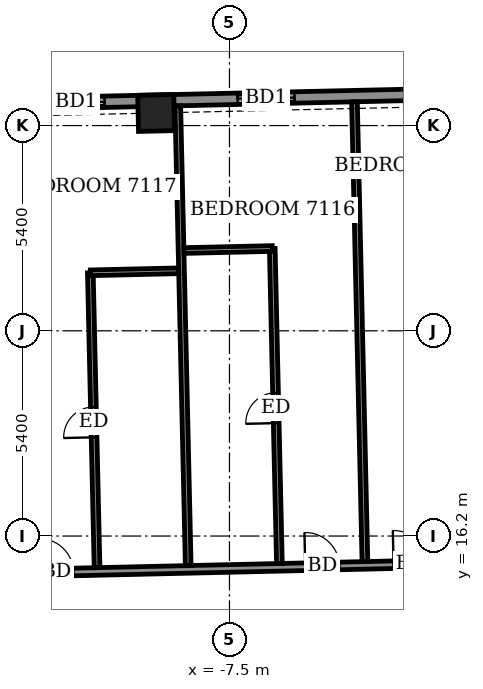
"""IFC4 building model, lengths in metres.
Left out: names, types, materials, properties, quantities, classifications, styles, units other than length and angle.
Written with IfcOpenShell. Run it as: python <this file> out.ifc"""

import sys

from ifc_helpers import new_model, si_unit, direction, frame, frame_2d, origin, origin_2d, place, context, subcontext, project, spatial, rectangle, extrude, element, fill, save


model = new_model("IFC4")
c1 = context("Model", 3, precision=1e-05, world=origin(), true_north=direction((0.0, 1.0)))
c2 = subcontext(c1, "Body", "Model", "MODEL_VIEW")
j1 = project(units=[si_unit("LENGTHUNIT", "METRE"), si_unit("PLANEANGLEUNIT", "RADIAN")], contexts=[c1])
p1 = place(None, origin())
s1 = spatial("IfcSite", under=j1, at=p1, CompositionType="ELEMENT")
p2 = place(p1, origin())
s2 = spatial("IfcBuilding", under=s1, at=p2, CompositionType="ELEMENT")
p3 = place(p2, frame((0.0, 0.0, 279.9)))
s3 = spatial("IfcBuildingStorey", under=s2, at=p3, CompositionType="ELEMENT", Elevation=279.9)
p4 = place(p3, frame((-9.429, 27.331, -0.55), z_axis=(0.0, 0.0, 1.0), x_axis=(-0.9997425919, -0.02268810132, 0.0)))
e1 = element("IfcColumn", 1, at=p4, inside=s3, PredefinedType="COLUMN", context=c2, shape_type="SweptSolid", body=[
    extrude(rectangle(XDim=0.95, YDim=0.95, at=origin_2d()), origin(), (0.0, 0.0, 1.0), 3.6),
])
p5 = place(p3, frame((26.216, 28.465, 0.0), z_axis=(0.0, 0.0, 1.0), x_axis=(-0.999742843677, -0.022677004157, 0.0)))
e2 = element("IfcWall", 2, at=p5, inside=s3, PredefinedType="SOLIDWALL", context=c2, shape_type="SweptSolid", body=[
    extrude(rectangle(XDim=49.836, YDim=0.3, at=frame_2d((24.918, 0.0))), origin(), (0.0, 0.0, 1.0), 2.5),
])
p6 = place(p5, frame((0.938, 0.0, 0.0)))
e3 = element("IfcOpeningElement", 3, at=p6, cuts=e2, PredefinedType="OPENING", context=c2, shape_type="SweptSolid", body=[
    extrude(rectangle(XDim=1.5, YDim=2.4, at=frame_2d((0.75, 1.2))), frame((0.0, 0.16, 0.0), z_axis=(0.0, -1.0, 0.0), x_axis=(1.0, 0.0, 0.0)), (0.0, 0.0, 1.0), 0.32),
])
p7 = place(p5, frame((4.087, 0.0, 0.0)))
e4 = element("IfcOpeningElement", 4, at=p7, cuts=e2, PredefinedType="OPENING", context=c2, shape_type="SweptSolid", body=[
    extrude(rectangle(XDim=1.5, YDim=2.4, at=frame_2d((0.75, 1.2))), frame((0.0, 0.16, 0.0), z_axis=(0.0, -1.0, 0.0), x_axis=(1.0, 0.0, 0.0)), (0.0, 0.0, 1.0), 0.32),
])
p8 = place(p5, frame((8.711, 0.0, 0.0)))
e5 = element("IfcOpeningElement", 5, at=p8, cuts=e2, PredefinedType="OPENING", context=c2, shape_type="SweptSolid", body=[
    extrude(rectangle(XDim=1.5, YDim=2.4, at=frame_2d((0.75, 1.2))), frame((0.0, 0.16, 0.0), z_axis=(0.0, -1.0, 0.0), x_axis=(1.0, 0.0, 0.0)), (0.0, 0.0, 1.0), 0.32),
])
p9 = place(p5, frame((12.067, 0.0, 0.0)))
e6 = element("IfcOpeningElement", 6, at=p9, cuts=e2, PredefinedType="OPENING", context=c2, shape_type="SweptSolid", body=[
    extrude(rectangle(XDim=1.5, YDim=2.4, at=frame_2d((0.75, 1.2))), frame((0.0, 0.16, 0.0), z_axis=(0.0, -1.0, 0.0), x_axis=(1.0, 0.0, 0.0)), (0.0, 0.0, 1.0), 0.32),
])
p10 = place(p5, frame((17.836, 0.0, 0.0)))
e7 = element("IfcOpeningElement", 7, at=p10, cuts=e2, PredefinedType="OPENING", context=c2, shape_type="SweptSolid", body=[
    extrude(rectangle(XDim=1.5, YDim=2.4, at=frame_2d((0.75, 1.2))), frame((0.0, 0.16, 0.0), z_axis=(0.0, -1.0, 0.0), x_axis=(1.0, 0.0, 0.0)), (0.0, 0.0, 1.0), 0.32),
])
p11 = place(p5, frame((22.849, 0.0, 0.0)))
e8 = element("IfcOpeningElement", 8, at=p11, cuts=e2, PredefinedType="OPENING", context=c2, shape_type="SweptSolid", body=[
    extrude(rectangle(XDim=1.5, YDim=2.4, at=frame_2d((0.75, 1.2))), frame((0.0, 0.16, 0.0), z_axis=(0.0, -1.0, 0.0), x_axis=(1.0, 0.0, 0.0)), (0.0, 0.0, 1.0), 0.32),
])
p12 = place(p5, frame((26.205, 0.0, 0.0)))
e9 = element("IfcOpeningElement", 9, at=p12, cuts=e2, PredefinedType="OPENING", context=c2, shape_type="SweptSolid", body=[
    extrude(rectangle(XDim=1.5, YDim=2.4, at=frame_2d((0.75, 1.2))), frame((0.0, 0.16, 0.0), z_axis=(0.0, -1.0, 0.0), x_axis=(1.0, 0.0, 0.0)), (0.0, 0.0, 1.0), 0.32),
])
p13 = place(p5, frame((32.011, 0.0, 0.0)))
e10 = element("IfcOpeningElement", 10, at=p13, cuts=e2, PredefinedType="OPENING", context=c2, shape_type="SweptSolid", body=[
    extrude(rectangle(XDim=1.5, YDim=2.4, at=frame_2d((0.75, 1.2))), frame((0.0, 0.16, 0.0), z_axis=(0.0, -1.0, 0.0), x_axis=(1.0, 0.0, 0.0)), (0.0, 0.0, 1.0), 0.32),
])
p14 = place(p5, frame((37.011, 0.0, 0.0)))
e11 = element("IfcOpeningElement", 11, at=p14, cuts=e2, PredefinedType="OPENING", context=c2, shape_type="SweptSolid", body=[
    extrude(rectangle(XDim=1.5, YDim=2.4, at=frame_2d((0.75, 1.2))), frame((0.0, 0.16, 0.0), z_axis=(0.0, -1.0, 0.0), x_axis=(1.0, 0.0, 0.0)), (0.0, 0.0, 1.0), 0.32),
])
p15 = place(p5, frame((40.367, 0.0, 0.0)))
e12 = element("IfcOpeningElement", 12, at=p15, cuts=e2, PredefinedType="OPENING", context=c2, shape_type="SweptSolid", body=[
    extrude(rectangle(XDim=1.5, YDim=2.4, at=frame_2d((0.75, 1.2))), frame((0.0, 0.16, 0.0), z_axis=(0.0, -1.0, 0.0), x_axis=(1.0, 0.0, 0.0)), (0.0, 0.0, 1.0), 0.32),
])
p16 = place(p5, frame((45.499, 0.0, 0.9)))
e13 = element("IfcOpeningElement", 13, at=p16, cuts=e2, PredefinedType="OPENING", context=c2, shape_type="SweptSolid", body=[
    extrude(rectangle(XDim=2.4, YDim=1.5, at=frame_2d((1.2, 0.75))), frame((0.0, 0.16, 0.0), z_axis=(0.0, -1.0, 0.0), x_axis=(1.0, 0.0, 0.0)), (0.0, 0.0, 1.0), 0.32),
])
p17 = place(p3, frame((-26.401, 14.918, 0.0), z_axis=(0.0, 0.0, 1.0), x_axis=(0.99974239733, 0.022696673341, 0.0)))
e14 = element("IfcWall", 14, at=p17, inside=s3, PredefinedType="PARTITIONING", context=c2, shape_type="SweptSolid", body=[
    extrude(rectangle(XDim=55.386, YDim=0.2, at=frame_2d((27.693, 0.0))), origin(), (0.0, 0.0, 1.0), 3.05),
])
p18 = place(p17, frame((52.889, 0.0, 0.0)))
e15 = element("IfcOpeningElement", 15, at=p18, cuts=e14, PredefinedType="OPENING", context=c2, shape_type="SweptSolid", body=[
    extrude(rectangle(XDim=1.0, YDim=2.1, at=frame_2d((0.5, 1.05))), frame((0.0, 0.11, 0.0), z_axis=(0.0, -1.0, 0.0), x_axis=(1.0, 0.0, 0.0)), (0.0, 0.0, 1.0), 0.22),
])
p19 = place(p17, frame((48.6, 0.0, 0.0)))
e16 = element("IfcOpeningElement", 16, at=p19, cuts=e14, PredefinedType="OPENING", context=c2, shape_type="SweptSolid", body=[
    extrude(rectangle(XDim=0.9, YDim=2.1, at=frame_2d((0.45, 1.05))), frame((0.0, 0.11, 0.0), z_axis=(0.0, -1.0, 0.0), x_axis=(1.0, 0.0, 0.0)), (0.0, 0.0, 1.0), 0.22),
])
p20 = place(p17, frame((41.8, 0.0, 0.0)))
e17 = element("IfcOpeningElement", 17, at=p20, cuts=e14, PredefinedType="OPENING", context=c2, shape_type="SweptSolid", body=[
    extrude(rectangle(XDim=0.9, YDim=2.1, at=frame_2d((0.45, 1.05))), frame((0.0, 0.11, 0.0), z_axis=(0.0, -1.0, 0.0), x_axis=(1.0, 0.0, 0.0)), (0.0, 0.0, 1.0), 0.22),
])
p21 = place(p17, frame((39.675, 0.0, 0.0)))
e18 = element("IfcOpeningElement", 18, at=p21, cuts=e14, PredefinedType="OPENING", context=c2, shape_type="SweptSolid", body=[
    extrude(rectangle(XDim=0.9, YDim=2.1, at=frame_2d((0.45, 1.05))), frame((0.0, 0.11, 0.0), z_axis=(0.0, -1.0, 0.0), x_axis=(1.0, 0.0, 0.0)), (0.0, 0.0, 1.0), 0.22),
])
p22 = place(p17, frame((32.675, 0.0, 0.0)))
e19 = element("IfcOpeningElement", 19, at=p22, cuts=e14, PredefinedType="OPENING", context=c2, shape_type="SweptSolid", body=[
    extrude(rectangle(XDim=0.9, YDim=2.1, at=frame_2d((0.45, 1.05))), frame((0.0, 0.11, 0.0), z_axis=(0.0, -1.0, 0.0), x_axis=(1.0, 0.0, 0.0)), (0.0, 0.0, 1.0), 0.22),
])
p23 = place(p17, frame((30.4, 0.0, 0.0)))
e20 = element("IfcOpeningElement", 20, at=p23, cuts=e14, PredefinedType="OPENING", context=c2, shape_type="SweptSolid", body=[
    extrude(rectangle(XDim=0.9, YDim=2.1, at=frame_2d((0.45, 1.05))), frame((0.0, 0.11, 0.0), z_axis=(0.0, -1.0, 0.0), x_axis=(1.0, 0.0, 0.0)), (0.0, 0.0, 1.0), 0.22),
])
p24 = place(p17, frame((23.225, 0.0, 0.0)))
e21 = element("IfcOpeningElement", 21, at=p24, cuts=e14, PredefinedType="OPENING", context=c2, shape_type="SweptSolid", body=[
    extrude(rectangle(XDim=0.9, YDim=2.1, at=frame_2d((0.45, 1.05))), frame((0.0, 0.11, 0.0), z_axis=(0.0, -1.0, 0.0), x_axis=(1.0, 0.0, 0.0)), (0.0, 0.0, 1.0), 0.22),
])
p25 = place(p17, frame((20.9, 0.0, 0.0)))
e22 = element("IfcOpeningElement", 22, at=p25, cuts=e14, PredefinedType="OPENING", context=c2, shape_type="SweptSolid", body=[
    extrude(rectangle(XDim=0.9, YDim=2.1, at=frame_2d((0.45, 1.05))), frame((0.0, 0.11, 0.0), z_axis=(0.0, -1.0, 0.0), x_axis=(1.0, 0.0, 0.0)), (0.0, 0.0, 1.0), 0.22),
])
p26 = place(p17, frame((13.9, 0.0, 0.0)))
e23 = element("IfcOpeningElement", 23, at=p26, cuts=e14, PredefinedType="OPENING", context=c2, shape_type="SweptSolid", body=[
    extrude(rectangle(XDim=0.9, YDim=2.1, at=frame_2d((0.45, 1.05))), frame((0.0, 0.11, 0.0), z_axis=(0.0, -1.0, 0.0), x_axis=(1.0, 0.0, 0.0)), (0.0, 0.0, 1.0), 0.22),
])
p27 = place(p17, frame((11.775, 0.0, 0.0)))
e24 = element("IfcOpeningElement", 24, at=p27, cuts=e14, PredefinedType="OPENING", context=c2, shape_type="SweptSolid", body=[
    extrude(rectangle(XDim=0.9, YDim=2.1, at=frame_2d((0.45, 1.05))), frame((0.0, 0.11, 0.0), z_axis=(0.0, -1.0, 0.0), x_axis=(1.0, 0.0, 0.0)), (0.0, 0.0, 1.0), 0.22),
])
p28 = place(p17, frame((1.65, 0.0, 0.0)))
e25 = element("IfcOpeningElement", 25, at=p28, cuts=e14, PredefinedType="OPENING", context=c2, shape_type="SweptSolid", body=[
    extrude(rectangle(XDim=1.0, YDim=2.1, at=frame_2d((0.5, 1.05))), frame((0.0, 0.11, 0.0), z_axis=(0.0, -1.0, 0.0), x_axis=(1.0, 0.0, 0.0)), (0.0, 0.0, 1.0), 0.22),
])
p29 = place(p17, frame((7.025, 0.0, 0.0)))
e26 = element("IfcOpeningElement", 26, at=p29, cuts=e14, PredefinedType="OPENING", context=c2, shape_type="SweptSolid", body=[
    extrude(rectangle(XDim=0.9, YDim=2.1, at=frame_2d((0.45, 1.05))), frame((0.0, 0.11, 0.0), z_axis=(0.0, -1.0, 0.0), x_axis=(1.0, 0.0, 0.0)), (0.0, 0.0, 1.0), 0.22),
])
p30 = place(p3, frame((-10.984, 15.368, 0.0), z_axis=(0.0, 0.0, 1.0), x_axis=(-0.022809307977, 0.999739833892, 0.0)))
e27 = element("IfcWall", 27, at=p30, inside=s3, PredefinedType="PARTITIONING", context=c2, shape_type="SweptSolid", body=[
    extrude(rectangle(XDim=7.76, YDim=0.15, at=frame_2d((3.88, 0.0))), origin(), (0.0, 0.0, 1.0), 3.05),
])
p31 = place(p30, frame((3.43, 0.0, 0.0)))
e28 = element("IfcOpeningElement", 28, at=p31, cuts=e27, PredefinedType="OPENING", context=c2, shape_type="SweptSolid", body=[
    extrude(rectangle(XDim=0.8, YDim=2.1, at=frame_2d((0.4, 1.05))), frame((0.0, 0.085, 0.0), z_axis=(0.0, -1.0, 0.0), x_axis=(1.0, 0.0, 0.0)), (0.0, 0.0, 1.0), 0.17),
])
p32 = place(p3, frame((-8.585, 15.422, 0.0), z_axis=(0.0, 0.0, 1.0), x_axis=(-0.02273928012, 0.99974142914, 0.0)))
e29 = element("IfcWall", 29, at=p32, inside=s3, PredefinedType="PARTITIONING", context=c2, shape_type="SweptSolid", body=[
    extrude(rectangle(XDim=12.1, YDim=0.15, at=frame_2d((6.05, 0.0))), origin(), (0.0, 0.0, 1.0), 2.5),
])
p33 = place(p3, frame((-6.186, 15.477, 0.0), z_axis=(0.0, 0.0, 1.0), x_axis=(-0.022676583998, 0.999742853207, 0.0)))
e30 = element("IfcWall", 30, at=p33, inside=s3, PredefinedType="PARTITIONING", context=c2, shape_type="SweptSolid", body=[
    extrude(rectangle(XDim=8.29, YDim=0.15, at=frame_2d((4.145, 0.0))), origin(), (0.0, 0.0, 1.0), 3.05),
])
p34 = place(p33, frame((3.695, 0.0, 0.0)))
e31 = element("IfcOpeningElement", 31, at=p34, cuts=e30, PredefinedType="OPENING", context=c2, shape_type="SweptSolid", body=[
    extrude(rectangle(XDim=0.8, YDim=2.1, at=frame_2d((0.4, 1.05))), frame((0.0, 0.085, 0.0), z_axis=(0.0, -1.0, 0.0), x_axis=(1.0, 0.0, 0.0)), (0.0, 0.0, 1.0), 0.17),
])
p35 = place(p3, frame((-3.936, 15.528, 0.0), z_axis=(0.0, 0.0, 1.0), x_axis=(-0.022719113715, 0.999741887625, 0.0)))
e32 = element("IfcWall", 32, at=p35, inside=s3, PredefinedType="PARTITIONING", context=c2, shape_type="SweptSolid", body=[
    extrude(rectangle(XDim=12.1, YDim=0.15, at=frame_2d((6.05, 0.0))), origin(), (0.0, 0.0, 1.0), 2.5),
])
p36 = place(p3, frame((-11.159, 23.126, 0.0), z_axis=(0.0, 0.0, 1.0), x_axis=(0.999740478815, 0.022781023197, 0.0)))
e33 = element("IfcWall", 33, at=p36, inside=s3, PredefinedType="PARTITIONING", context=c2, shape_type="SweptSolid", body=[
    extrude(rectangle(XDim=2.325, YDim=0.15, at=frame_2d((1.163, 0.0))), origin(), (0.0, 0.0, 1.0), 3.05),
])
p37 = place(p3, frame((-8.696, 23.712, 0.0), z_axis=(0.0, 0.0, 1.0), x_axis=(0.999740260747, 0.02279059109, 0.0)))
e34 = element("IfcWall", 34, at=p37, inside=s3, PredefinedType="PARTITIONING", context=c2, shape_type="SweptSolid", body=[
    extrude(rectangle(XDim=2.324, YDim=0.15, at=frame_2d((1.162, 0.0))), origin(), (0.0, 0.0, 1.0), 3.05),
])
p38 = place(p13, origin())
e35 = element("IfcDoor", 35, at=p38, inside=s3, OperationType="SLIDING_TO_LEFT", PredefinedType="DOOR", context=c2, shape_type="SweptSolid", body=[
    extrude(rectangle(XDim=1.5, YDim=2.4, at=frame_2d((0.75, 1.2))), frame((0.0, 0.025, 0.0), z_axis=(0.0, -1.0, 0.0), x_axis=(1.0, 0.0, 0.0)), (0.0, 0.0, 1.0), 0.05),
])
fill(e10, e35)
p39 = place(p14, origin())
e36 = element("IfcDoor", 36, at=p39, inside=s3, OperationType="SLIDING_TO_LEFT", PredefinedType="DOOR", context=c2, shape_type="SweptSolid", body=[
    extrude(rectangle(XDim=1.5, YDim=2.4, at=frame_2d((0.75, 1.2))), frame((0.0, 0.025, 0.0), z_axis=(0.0, -1.0, 0.0), x_axis=(1.0, 0.0, 0.0)), (0.0, 0.0, 1.0), 0.05),
])
fill(e11, e36)
p40 = place(p24, origin())
e37 = element("IfcDoor", 37, at=p40, inside=s3, OperationType="SINGLE_SWING_LEFT", PredefinedType="DOOR", context=c2, shape_type="SweptSolid", body=[
    extrude(rectangle(XDim=0.9, YDim=2.1, at=frame_2d((0.45, 1.05))), frame((0.0, 0.025, 0.0), z_axis=(0.0, -1.0, 0.0), x_axis=(1.0, 0.0, 0.0)), (0.0, 0.0, 1.0), 0.05),
])
fill(e21, e37)
p41 = place(p25, origin())
e38 = element("IfcDoor", 38, at=p41, inside=s3, OperationType="SINGLE_SWING_RIGHT", PredefinedType="DOOR", context=c2, shape_type="SweptSolid", body=[
    extrude(rectangle(XDim=0.9, YDim=2.1, at=frame_2d((0.45, 1.05))), frame((0.0, 0.025, 0.0), z_axis=(0.0, -1.0, 0.0), x_axis=(1.0, 0.0, 0.0)), (0.0, 0.0, 1.0), 0.05),
])
fill(e22, e38)
p42 = place(p34, origin())
e39 = element("IfcDoor", 39, at=p42, inside=s3, OperationType="SINGLE_SWING_RIGHT", PredefinedType="DOOR", context=c2, shape_type="SweptSolid", body=[
    extrude(rectangle(XDim=0.8, YDim=2.1, at=frame_2d((0.4, 1.05))), frame((0.0, 0.025, 0.0), z_axis=(0.0, -1.0, 0.0), x_axis=(1.0, 0.0, 0.0)), (0.0, 0.0, 1.0), 0.05),
])
fill(e31, e39)
p43 = place(p26, origin())
e40 = element("IfcDoor", 40, at=p43, inside=s3, OperationType="SINGLE_SWING_LEFT", PredefinedType="DOOR", context=c2, shape_type="SweptSolid", body=[
    extrude(rectangle(XDim=0.9, YDim=2.1, at=frame_2d((0.45, 1.05))), frame((0.0, 0.025, 0.0), z_axis=(0.0, -1.0, 0.0), x_axis=(1.0, 0.0, 0.0)), (0.0, 0.0, 1.0), 0.05),
])
fill(e23, e40)
p44 = place(p31, origin())
e41 = element("IfcDoor", 41, at=p44, inside=s3, OperationType="SINGLE_SWING_LEFT", PredefinedType="DOOR", context=c2, shape_type="SweptSolid", body=[
    extrude(rectangle(XDim=0.8, YDim=2.1, at=frame_2d((0.4, 1.05))), frame((0.0, 0.025, 0.0), z_axis=(0.0, -1.0, 0.0), x_axis=(1.0, 0.0, 0.0)), (0.0, 0.0, 1.0), 0.05),
])
fill(e28, e41)
save(model, sys.argv[1])
